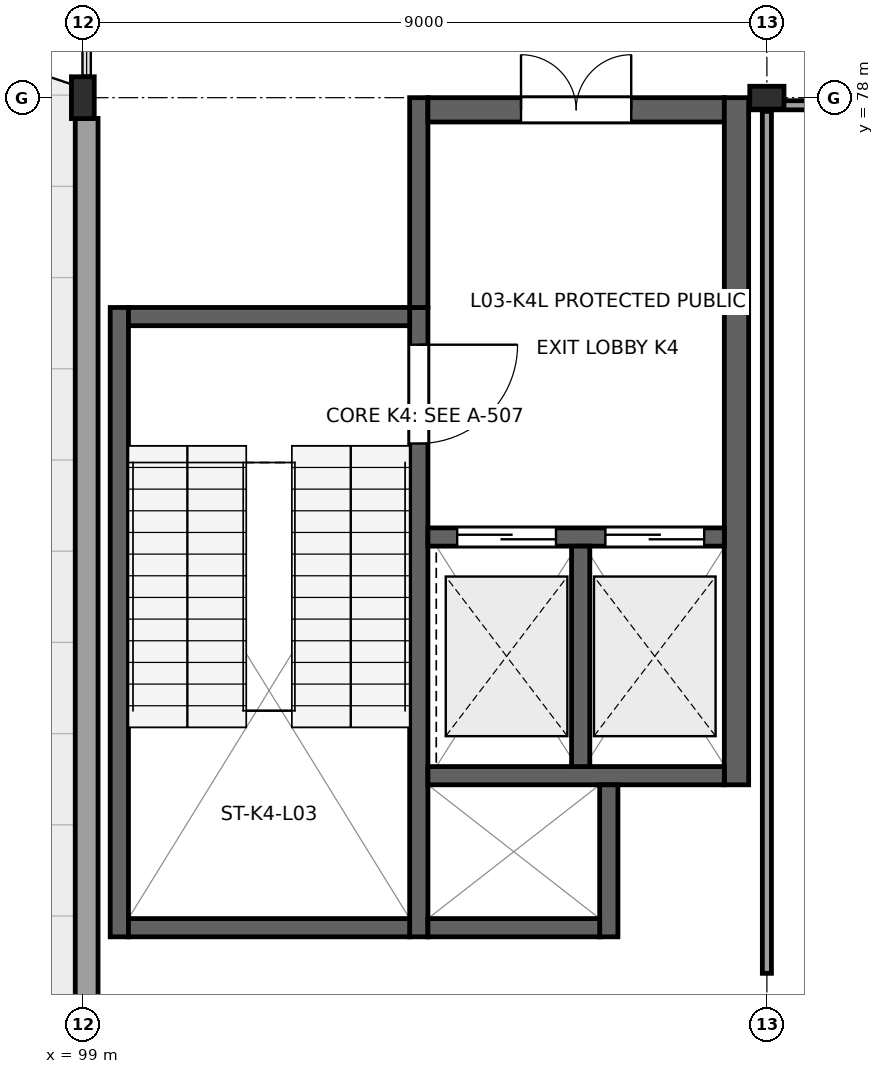
"""IFC4 building model, lengths in metres.
Left out: names, types, materials, properties, quantities, classifications, styles, units other than length and angle.
Written with IfcOpenShell. Run it as: python <this file> out.ifc"""

import sys

from ifc_helpers import new_model, si_unit, direction, frame, frame_2d, origin, origin_2d, place, context, subcontext, project, spatial, rectangle, i_section, extrude, element, fill, save


model = new_model("IFC4")
c1 = context("Model", 3, precision=1e-05, world=origin(), true_north=direction((0.0, 1.0)))
c2 = subcontext(c1, "Body", "Model", "MODEL_VIEW")
j1 = project(units=[si_unit("LENGTHUNIT", "METRE"), si_unit("PLANEANGLEUNIT", "RADIAN")], contexts=[c1])
p1 = place(None, origin())
s1 = spatial("IfcSite", under=j1, at=p1, CompositionType="ELEMENT")
p2 = place(p1, origin())
s2 = spatial("IfcBuilding", under=s1, at=p2, CompositionType="ELEMENT")
p3 = place(p2, frame((0.0, 0.0, 14.4)))
s3 = spatial("IfcBuildingStorey", under=s2, at=p3, CompositionType="ELEMENT", Elevation=14.4)
p4 = place(p3, frame((99.0, 78.0, 0.0), z_axis=(0.0, 0.0, 1.0), x_axis=(1.0, 0.0, 0.0)))
e1 = element("IfcColumn", 1, at=p4, inside=s3, PredefinedType="COLUMN", context=c2, shape_type="SweptSolid", body=[
    extrude(i_section(OverallWidth=0.3, OverallDepth=0.55, WebThickness=0.015, FlangeThickness=0.029, at=origin_2d()), origin(), (0.0, 0.0, 1.0), 4.5),
])
p5 = place(p3, frame((108.0, 78.0, 0.0), z_axis=(0.0, 0.0, 1.0), x_axis=(0.0, 1.0, 0.0)))
e2 = element("IfcColumn", 2, at=p5, inside=s3, PredefinedType="COLUMN", context=c2, shape_type="SweptSolid", body=[
    extrude(i_section(OverallWidth=0.3, OverallDepth=0.45, WebThickness=0.014, FlangeThickness=0.026, at=origin_2d()), origin(), (0.0, 0.0, 1.0), 4.5),
])
p6 = place(p3, frame((99.05, 77.727, 0.0), z_axis=(0.0, 0.0, 1.0), x_axis=(0.0, -1.0, 0.0)))
e3 = element("IfcWall", 3, at=p6, inside=s3, PredefinedType="SOLIDWALL", context=c2, shape_type="SweptSolid", body=[
    extrude(rectangle(XDim=11.599, YDim=0.3, at=frame_2d((5.8, 0.0))), origin(), (0.0, 0.0, 1.0), 3.705),
])
p7 = place(p3, frame((99.48, 66.96, 0.0), z_axis=(0.0, 0.0, 1.0), x_axis=(0.0, 1.0, 0.0)))
e4 = element("IfcWall", 4, at=p7, inside=s3, PredefinedType="SHEAR", context=c2, shape_type="SweptSolid", body=[
    extrude(rectangle(XDim=8.28, YDim=0.24, at=frame_2d((4.14, 0.0))), origin(), (0.0, 0.0, 1.0), 4.31),
])
p8 = place(p3, frame((103.42, 66.96, 0.0), z_axis=(0.0, 0.0, 1.0), x_axis=(0.0, 1.0, 0.0)))
e5 = element("IfcWall", 5, at=p8, inside=s3, PredefinedType="SHEAR", context=c2, shape_type="SweptSolid", body=[
    extrude(rectangle(XDim=8.28, YDim=0.24, at=frame_2d((4.14, 0.0))), origin(), (0.0, 0.0, 1.0), 4.31),
])
p9 = place(p8, frame((6.49, 0.0, 0.0)))
e6 = element("IfcOpeningElement", 6, at=p9, cuts=e5, PredefinedType="OPENING", context=c2, shape_type="SweptSolid", body=[
    extrude(rectangle(XDim=1.3, YDim=2.2, at=frame_2d((0.65, 1.1))), frame((0.0, 0.135, 0.0), z_axis=(0.0, -1.0, 0.0), x_axis=(1.0, 0.0, 0.0)), (0.0, 0.0, 1.0), 0.27),
])
for number, where, z_axis, x_axis in (
    (7, (99.6, 67.08, 0.0), (0.0, 0.0, 1.0), (1.0, 0.0, 0.0)),
    (8, (99.6, 75.12, 0.0), (0.0, 0.0, 1.0), (1.0, 0.0, 0.0)),
):
    element("IfcWall", number, at=place(p3, frame(where, z_axis=z_axis, x_axis=x_axis)), inside=s3, PredefinedType="SHEAR", context=c2, shape_type="SweptSolid", body=[
        extrude(rectangle(XDim=3.7, YDim=0.24, at=frame_2d((1.85, 0.0))), origin(), (0.0, 0.0, 1.0), 4.31),
    ])
p10 = place(p3, frame((103.42, 75.24, 0.0), z_axis=(0.0, 0.0, 1.0), x_axis=(0.0, 1.0, 0.0)))
e9 = element("IfcWall", 9, at=p10, inside=s3, PredefinedType="SHEAR", context=c2, shape_type="SweptSolid", body=[
    extrude(rectangle(XDim=2.76, YDim=0.24, at=frame_2d((1.38, 0.0))), origin(), (0.0, 0.0, 1.0), 4.16),
])
p11 = place(p3, frame((103.54, 77.84, 0.0), z_axis=(0.0, 0.0, 1.0), x_axis=(1.0, 0.0, 0.0)))
e10 = element("IfcWall", 10, at=p11, inside=s3, PredefinedType="SHEAR", context=c2, shape_type="SweptSolid", body=[
    extrude(rectangle(XDim=3.9, YDim=0.32, at=frame_2d((1.95, 0.0))), origin(), (0.0, 0.0, 1.0), 4.16),
])
p12 = place(p11, frame((1.225, 0.0, 0.0)))
e11 = element("IfcOpeningElement", 11, at=p12, cuts=e10, PredefinedType="OPENING", context=c2, shape_type="SweptSolid", body=[
    extrude(rectangle(XDim=1.45, YDim=2.2, at=frame_2d((0.725, 1.1))), frame((0.0, 0.175, 0.0), z_axis=(0.0, -1.0, 0.0), x_axis=(1.0, 0.0, 0.0)), (0.0, 0.0, 1.0), 0.35),
])
p13 = place(p3, frame((107.6, 68.96, 0.0), z_axis=(0.0, 0.0, 1.0), x_axis=(0.0, 1.0, 0.0)))
e12 = element("IfcWall", 12, at=p13, inside=s3, PredefinedType="SHEAR", context=c2, shape_type="SweptSolid", body=[
    extrude(rectangle(XDim=9.04, YDim=0.32, at=frame_2d((4.52, 0.0))), origin(), (0.0, 0.0, 1.0), 4.16),
])
p14 = place(p3, frame((103.54, 72.22, 0.0), z_axis=(0.0, 0.0, 1.0), x_axis=(1.0, 0.0, 0.0)))
e13 = element("IfcWall", 13, at=p14, inside=s3, PredefinedType="SHEAR", context=c2, shape_type="SweptSolid", body=[
    extrude(rectangle(XDim=3.9, YDim=0.24, at=frame_2d((1.95, 0.0))), origin(), (0.0, 0.0, 1.0), 4.31),
])
p15 = place(p14, frame((0.385, 0.0, 0.0)))
e14 = element("IfcOpeningElement", 14, at=p15, cuts=e13, PredefinedType="OPENING", context=c2, shape_type="SweptSolid", body=[
    extrude(rectangle(XDim=1.3, YDim=2.2, at=frame_2d((0.65, 1.1))), frame((0.0, 0.135, 0.0), z_axis=(0.0, -1.0, 0.0), x_axis=(1.0, 0.0, 0.0)), (0.0, 0.0, 1.0), 0.27),
])
p16 = place(p14, frame((2.335, 0.0, 0.0)))
e15 = element("IfcOpeningElement", 15, at=p16, cuts=e13, PredefinedType="OPENING", context=c2, shape_type="SweptSolid", body=[
    extrude(rectangle(XDim=1.3, YDim=2.2, at=frame_2d((0.65, 1.1))), frame((0.0, 0.135, 0.0), z_axis=(0.0, -1.0, 0.0), x_axis=(1.0, 0.0, 0.0)), (0.0, 0.0, 1.0), 0.27),
])
p17 = place(p3, frame((103.54, 69.08, 0.0), z_axis=(0.0, 0.0, 1.0), x_axis=(1.0, 0.0, 0.0)))
e16 = element("IfcWall", 16, at=p17, inside=s3, PredefinedType="SHEAR", context=c2, shape_type="SweptSolid", body=[
    extrude(rectangle(XDim=3.9, YDim=0.24, at=frame_2d((1.95, 0.0))), origin(), (0.0, 0.0, 1.0), 4.31),
])
p18 = place(p3, frame((105.55, 69.2, 0.0), z_axis=(0.0, 0.0, 1.0), x_axis=(0.0, 1.0, 0.0)))
e17 = element("IfcWall", 17, at=p18, inside=s3, PredefinedType="SHEAR", context=c2, shape_type="SweptSolid", body=[
    extrude(rectangle(XDim=2.9, YDim=0.24, at=frame_2d((1.45, 0.0))), origin(), (0.0, 0.0, 1.0), 4.31),
])
p19 = place(p3, frame((105.92, 66.96, 0.0), z_axis=(0.0, 0.0, 1.0), x_axis=(0.0, 1.0, 0.0)))
e18 = element("IfcWall", 18, at=p19, inside=s3, PredefinedType="SHEAR", context=c2, shape_type="SweptSolid", body=[
    extrude(rectangle(XDim=2.0, YDim=0.24, at=frame_2d((1.0, 0.0))), origin(), (0.0, 0.0, 1.0), 4.31),
])
p20 = place(p3, frame((103.54, 67.08, 0.0), z_axis=(0.0, 0.0, 1.0), x_axis=(1.0, 0.0, 0.0)))
e19 = element("IfcWall", 19, at=p20, inside=s3, PredefinedType="SHEAR", context=c2, shape_type="SweptSolid", body=[
    extrude(rectangle(XDim=2.26, YDim=0.24, at=frame_2d((1.13, 0.0))), origin(), (0.0, 0.0, 1.0), 4.31),
])
p21 = place(p3, frame((108.0, 66.48, 0.0), z_axis=(0.0, 0.0, 1.0), x_axis=(0.0, 1.0, 0.0)))
e20 = element("IfcWall", 20, at=p21, inside=s3, PredefinedType="PARTITIONING", context=c2, shape_type="SweptSolid", body=[
    extrude(rectangle(XDim=11.34, YDim=0.12, at=frame_2d((5.67, 0.0))), origin(), (0.0, 0.0, 1.0), 3.645),
])
p22 = place(p3, frame((107.823, 77.9, 0.0), z_axis=(0.0, 0.0, 1.0), x_axis=(1.0, 0.0, 0.0)))
e21 = element("IfcWall", 21, at=p22, inside=s3, PredefinedType="PARTITIONING", context=c2, shape_type="SweptSolid", body=[
    extrude(rectangle(XDim=17.597, YDim=0.12, at=frame_2d((8.798, 0.0))), origin(), (0.0, 0.0, 1.0), 3.655),
])
p23 = place(p22, frame((7.645, 0.0, 0.0)))
e22 = element("IfcOpeningElement", 22, at=p23, cuts=e21, PredefinedType="OPENING", context=c2, shape_type="SweptSolid", body=[
    extrude(rectangle(XDim=0.9, YDim=2.1, at=frame_2d((0.45, 1.05))), frame((0.0, 0.075, 0.0), z_axis=(0.0, -1.0, 0.0), x_axis=(1.0, 0.0, 0.0)), (0.0, 0.0, 1.0), 0.15),
])
p24 = place(p9, frame((1.3, 0.0, 0.0), z_axis=(0.0, 0.0, 1.0), x_axis=(-1.0, 0.0, 0.0)))
e23 = element("IfcDoor", 23, at=p24, inside=s3, OperationType="SINGLE_SWING_RIGHT", PredefinedType="DOOR", context=c2, shape_type="SweptSolid", body=[
    extrude(rectangle(XDim=1.3, YDim=2.2, at=frame_2d((0.65, 1.1))), frame((0.0, 0.025, 0.0), z_axis=(0.0, -1.0, 0.0), x_axis=(1.0, 0.0, 0.0)), (0.0, 0.0, 1.0), 0.05),
])
fill(e6, e23)
p25 = place(p12, origin())
e24 = element("IfcDoor", 24, at=p25, inside=s3, OperationType="DOUBLE_DOOR_SINGLE_SWING", PredefinedType="DOOR", context=c2, shape_type="SweptSolid", body=[
    extrude(rectangle(XDim=1.45, YDim=2.2, at=frame_2d((0.725, 1.1))), frame((0.0, 0.025, 0.0), z_axis=(0.0, -1.0, 0.0), x_axis=(1.0, 0.0, 0.0)), (0.0, 0.0, 1.0), 0.05),
])
fill(e11, e24)
p26 = place(p15, origin())
e25 = element("IfcDoor", 25, at=p26, inside=s3, OperationType="DOUBLE_DOOR_SLIDING", PredefinedType="DOOR", context=c2, shape_type="SweptSolid", body=[
    extrude(rectangle(XDim=1.3, YDim=2.2, at=frame_2d((0.65, 1.1))), frame((0.0, 0.025, 0.0), z_axis=(0.0, -1.0, 0.0), x_axis=(1.0, 0.0, 0.0)), (0.0, 0.0, 1.0), 0.05),
])
fill(e14, e25)
p27 = place(p16, origin())
e26 = element("IfcDoor", 26, at=p27, inside=s3, OperationType="DOUBLE_DOOR_SLIDING", PredefinedType="DOOR", context=c2, shape_type="SweptSolid", body=[
    extrude(rectangle(XDim=1.3, YDim=2.2, at=frame_2d((0.65, 1.1))), frame((0.0, 0.025, 0.0), z_axis=(0.0, -1.0, 0.0), x_axis=(1.0, 0.0, 0.0)), (0.0, 0.0, 1.0), 0.05),
])
fill(e15, e26)
save(model, sys.argv[1])
